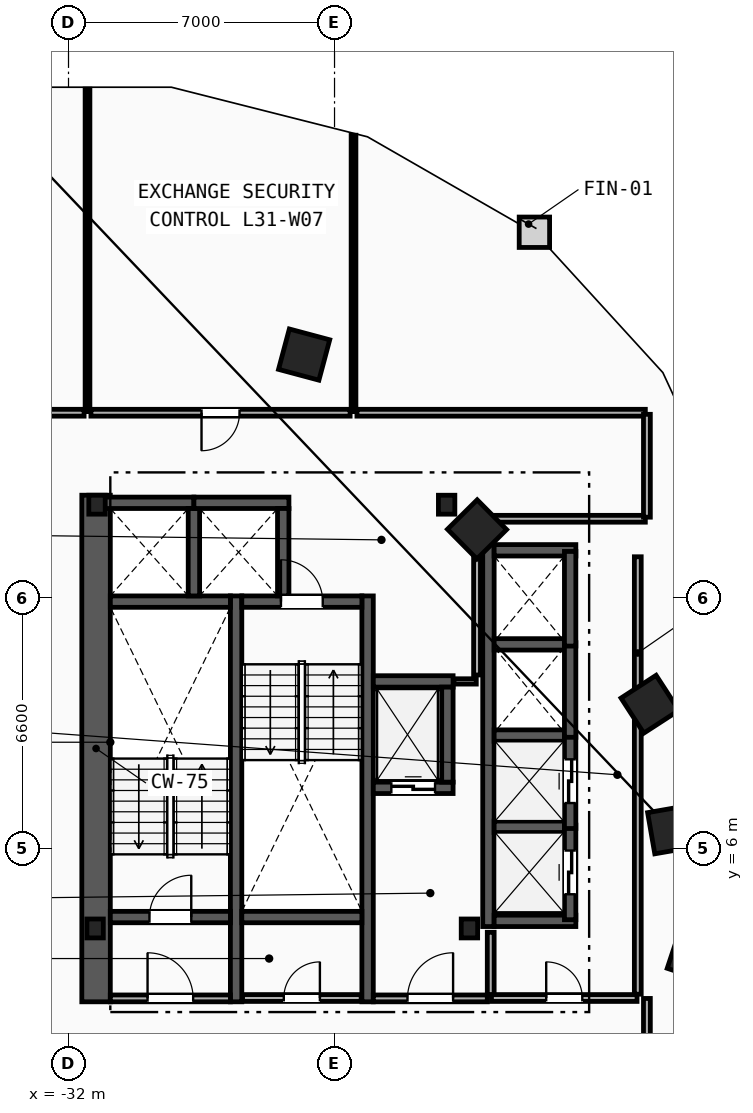
"""IFC4 building model, lengths in metres.
Left out: names, types, materials, properties, quantities, classifications, styles, units other than length and angle.
Written with IfcOpenShell. Run it as: python <this file> out.ifc"""

import sys

from ifc_helpers import new_model, si_unit, direction, frame, frame_2d, origin, origin_2d, place, context, subcontext, project, spatial, rectangle, i_section, extrude, element, fill, save


model = new_model("IFC4")
c1 = context("Model", 3, precision=1e-05, world=origin(), true_north=direction((0.0, 1.0)))
c2 = subcontext(c1, "Body", "Model", "MODEL_VIEW")
j1 = project(units=[si_unit("LENGTHUNIT", "METRE"), si_unit("PLANEANGLEUNIT", "RADIAN")], contexts=[c1])
p1 = place(None, origin())
s1 = spatial("IfcSite", under=j1, at=p1, CompositionType="ELEMENT")
p2 = place(p1, origin())
s2 = spatial("IfcBuilding", under=s1, at=p2, CompositionType="ELEMENT")
p3 = place(p2, frame((0.0, 0.0, 121.4)))
s3 = spatial("IfcBuildingStorey", under=s2, at=p3, CompositionType="ELEMENT", Elevation=121.4)
for number, where, z_axis, x_axis in (
    (1, (-31.3, 3.9, 0.0), (0.0, 0.0, 1.0), (1.0, 0.0, 0.0)),
    (2, (-21.45, 3.9, 0.0), (0.0, 0.0, 1.0), (1.0, 0.0, 0.0)),
    (3, (-22.05, 15.05, 0.0), (0.0, 0.0, 1.0), (1.0, 0.0, 0.0)),
    (4, (-31.25, 15.05, 0.0), (0.0, 0.0, 1.0), (1.0, 0.0, 0.0)),
):
    element("IfcColumn", number, at=place(p3, frame(where, z_axis=z_axis, x_axis=x_axis)), inside=s3, PredefinedType="COLUMN", context=c2, shape_type="SweptSolid", body=[
        extrude(i_section(OverallWidth=0.432, OverallDepth=0.498, WebThickness=0.056, FlangeThickness=0.089, FilletRadius=0.018, at=origin_2d()), origin(), (0.0, 0.0, 1.0), 3.6),
    ])
for number, where, z_axis, x_axis in (
    (5, (-15.55, 3.2, 0.0), (0.0, 0.0, 1.0), (0.315, 0.949, 0.0)),
    (6, (-16.125, 6.5, 0.0), (0.0, 0.0, 1.0), (-0.172, 0.985, 0.0)),
    (7, (-16.7, 9.8, 0.0), (0.0, 0.0, 1.0), (-0.544, 0.839, 0.0)),
    (8, (-21.25, 14.4, 0.0), (0.0, 0.0, 1.0), (-0.703, 0.711, 0.0)),
    (9, (-25.8, 19.0, 0.0), (0.0, 0.0, 1.0), (-0.966, 0.259, 0.0)),
):
    element("IfcColumn", number, at=place(p3, frame(where, z_axis=z_axis, x_axis=x_axis)), inside=s3, PredefinedType="COLUMN", context=c2, shape_type="SweptSolid", body=[
        extrude(rectangle(XDim=1.1, YDim=1.1, at=origin_2d()), origin(), (0.0, 0.0, 1.0), 3.6),
    ])
p4 = place(p3, frame((-31.275, 1.97, 0.0), z_axis=(0.0, 0.0, 1.0), x_axis=(0.0, 1.0, 0.0)))
e10 = element("IfcWall", 10, at=p4, inside=s3, PredefinedType="SHEAR", context=c2, shape_type="SweptSolid", body=[
    extrude(rectangle(XDim=13.33, YDim=0.75, at=frame_2d((6.665, 0.0))), origin(), (0.0, 0.0, 1.0), 3.3),
])
for number, where, z_axis, x_axis in (
    (11, (-27.59, 1.97, 0.0), (0.0, 0.0, 1.0), (0.0, 1.0, 0.0)),
    (12, (-24.13, 1.97, 0.0), (0.0, 0.0, 1.0), (0.0, 1.0, 0.0)),
):
    element("IfcWall", number, at=place(p3, frame(where, z_axis=z_axis, x_axis=x_axis)), inside=s3, PredefinedType="SHEAR", context=c2, shape_type="SweptSolid", body=[
        extrude(rectangle(XDim=10.68, YDim=0.3, at=frame_2d((5.34, 0.0))), origin(), (0.0, 0.0, 1.0), 3.3),
    ])
p5 = place(p3, frame((-30.9, 4.2, 0.0), z_axis=(0.0, 0.0, 1.0), x_axis=(1.0, 0.0, 0.0)))
e13 = element("IfcWall", 13, at=p5, inside=s3, PredefinedType="SHEAR", context=c2, shape_type="SweptSolid", body=[
    extrude(rectangle(XDim=3.16, YDim=0.3, at=frame_2d((1.58, 0.0))), origin(), (0.0, 0.0, 1.0), 3.3),
])
p6 = place(p5, frame((1.03, 0.0, 0.0)))
e14 = element("IfcOpeningElement", 14, at=p6, cuts=e13, PredefinedType="OPENING", context=c2, shape_type="SweptSolid", body=[
    extrude(rectangle(XDim=1.1, YDim=2.15, at=frame_2d((0.55, 1.075))), frame((0.0, 0.16, 0.0), z_axis=(0.0, -1.0, 0.0), x_axis=(1.0, 0.0, 0.0)), (0.0, 0.0, 1.0), 0.32),
])
p7 = place(p3, frame((-30.9, 12.5, 0.0), z_axis=(0.0, 0.0, 1.0), x_axis=(1.0, 0.0, 0.0)))
e15 = element("IfcWall", 15, at=p7, inside=s3, PredefinedType="SHEAR", context=c2, shape_type="SweptSolid", body=[
    extrude(rectangle(XDim=3.16, YDim=0.3, at=frame_2d((1.58, 0.0))), origin(), (0.0, 0.0, 1.0), 3.3),
])
p8 = place(p3, frame((-27.44, 12.5, 0.0), z_axis=(0.0, 0.0, 1.0), x_axis=(1.0, 0.0, 0.0)))
e16 = element("IfcWall", 16, at=p8, inside=s3, PredefinedType="SHEAR", context=c2, shape_type="SweptSolid", body=[
    extrude(rectangle(XDim=3.16, YDim=0.3, at=frame_2d((1.58, 0.0))), origin(), (0.0, 0.0, 1.0), 3.3),
])
p9 = place(p8, frame((1.03, 0.0, 0.0)))
e17 = element("IfcOpeningElement", 17, at=p9, cuts=e16, PredefinedType="OPENING", context=c2, shape_type="SweptSolid", body=[
    extrude(rectangle(XDim=1.1, YDim=2.15, at=frame_2d((0.55, 1.075))), frame((0.0, 0.16, 0.0), z_axis=(0.0, -1.0, 0.0), x_axis=(1.0, 0.0, 0.0)), (0.0, 0.0, 1.0), 0.32),
])
p10 = place(p3, frame((-27.44, 4.2, 0.0), z_axis=(0.0, 0.0, 1.0), x_axis=(1.0, 0.0, 0.0)))
e18 = element("IfcWall", 18, at=p10, inside=s3, PredefinedType="SHEAR", context=c2, shape_type="SweptSolid", body=[
    extrude(rectangle(XDim=3.16, YDim=0.3, at=frame_2d((1.58, 0.0))), origin(), (0.0, 0.0, 1.0), 3.3),
])
p11 = place(p3, frame((-20.89, 2.15, 0.0), z_axis=(0.0, 0.0, 1.0), x_axis=(0.0, 1.0, 0.0)))
e19 = element("IfcWall", 19, at=p11, inside=s3, PredefinedType="PARTITIONING", context=c2, shape_type="SweptSolid", body=[
    extrude(rectangle(XDim=1.65, YDim=0.18, at=frame_2d((0.825, 0.0))), origin(), (0.0, 0.0, 1.0), 3.3),
])
p12 = place(p3, frame((-23.98, 2.06, 0.0), z_axis=(0.0, 0.0, 1.0), x_axis=(1.0, 0.0, 0.0)))
e20 = element("IfcWall", 20, at=p12, inside=s3, PredefinedType="PARTITIONING", context=c2, shape_type="SweptSolid", body=[
    extrude(rectangle(XDim=3.0, YDim=0.18, at=frame_2d((1.5, 0.0))), origin(), (0.0, 0.0, 1.0), 3.3),
])
p13 = place(p12, frame((0.9, 0.0, 0.0)))
e21 = element("IfcOpeningElement", 21, at=p13, cuts=e20, PredefinedType="OPENING", context=c2, shape_type="SweptSolid", body=[
    extrude(rectangle(XDim=1.2, YDim=2.15, at=frame_2d((0.6, 1.075))), frame((0.0, 0.1, 0.0), z_axis=(0.0, -1.0, 0.0), x_axis=(1.0, 0.0, 0.0)), (0.0, 0.0, 1.0), 0.2),
])
p14 = place(p3, frame((-30.9, 2.06, 0.0), z_axis=(0.0, 0.0, 1.0), x_axis=(1.0, 0.0, 0.0)))
e22 = element("IfcWall", 22, at=p14, inside=s3, PredefinedType="PARTITIONING", context=c2, shape_type="SweptSolid", body=[
    extrude(rectangle(XDim=3.16, YDim=0.18, at=frame_2d((1.58, 0.0))), origin(), (0.0, 0.0, 1.0), 3.3),
])
p15 = place(p14, frame((0.98, 0.0, 0.0)))
e23 = element("IfcOpeningElement", 23, at=p15, cuts=e22, PredefinedType="OPENING", context=c2, shape_type="SweptSolid", body=[
    extrude(rectangle(XDim=1.2, YDim=2.15, at=frame_2d((0.6, 1.075))), frame((0.0, 0.1, 0.0), z_axis=(0.0, -1.0, 0.0), x_axis=(1.0, 0.0, 0.0)), (0.0, 0.0, 1.0), 0.2),
])
p16 = place(p3, frame((-23.98, 7.6, 0.0), z_axis=(0.0, 0.0, 1.0), x_axis=(1.0, 0.0, 0.0)))
e24 = element("IfcWall", 24, at=p16, inside=s3, PredefinedType="SHEAR", context=c2, shape_type="SweptSolid", body=[
    extrude(rectangle(XDim=2.1, YDim=0.3, at=frame_2d((1.05, 0.0))), origin(), (0.0, 0.0, 1.0), 3.3),
])
p17 = place(p16, frame((0.475, 0.0, 0.0)))
e25 = element("IfcOpeningElement", 25, at=p17, cuts=e24, PredefinedType="OPENING", context=c2, shape_type="SweptSolid", body=[
    extrude(rectangle(XDim=1.15, YDim=2.2, at=frame_2d((0.575, 1.1))), frame((0.0, 0.16, 0.0), z_axis=(0.0, -1.0, 0.0), x_axis=(1.0, 0.0, 0.0)), (0.0, 0.0, 1.0), 0.32),
])
p18 = place(p3, frame((-23.98, 10.4, 0.0), z_axis=(0.0, 0.0, 1.0), x_axis=(1.0, 0.0, 0.0)))
e26 = element("IfcWall", 26, at=p18, inside=s3, PredefinedType="SHEAR", context=c2, shape_type="SweptSolid", body=[
    extrude(rectangle(XDim=2.1, YDim=0.3, at=frame_2d((1.05, 0.0))), origin(), (0.0, 0.0, 1.0), 3.3),
])
for number, where, z_axis, x_axis in (
    (27, (-22.03, 7.75, 0.0), (0.0, 0.0, 1.0), (0.0, 1.0, 0.0)),
    (28, (-31.2, 15.1, 0.0), (0.0, 0.0, 1.0), (1.0, 0.0, 0.0)),
):
    element("IfcWall", number, at=place(p3, frame(where, z_axis=z_axis, x_axis=x_axis)), inside=s3, PredefinedType="SHEAR", context=c2, shape_type="SweptSolid", body=[
        extrude(rectangle(XDim=2.5, YDim=0.3, at=frame_2d((1.25, 0.0))), origin(), (0.0, 0.0, 1.0), 3.3),
    ])
p19 = place(p3, frame((-28.7, 12.65, 0.0), z_axis=(0.0, 0.0, 1.0), x_axis=(0.0, 1.0, 0.0)))
e29 = element("IfcWall", 29, at=p19, inside=s3, PredefinedType="SHEAR", context=c2, shape_type="SweptSolid", body=[
    extrude(rectangle(XDim=2.3, YDim=0.3, at=frame_2d((1.15, 0.0))), origin(), (0.0, 0.0, 1.0), 3.3),
])
p20 = place(p3, frame((-28.7, 15.1, 0.0), z_axis=(0.0, 0.0, 1.0), x_axis=(1.0, 0.0, 0.0)))
e30 = element("IfcWall", 30, at=p20, inside=s3, PredefinedType="SHEAR", context=c2, shape_type="SweptSolid", body=[
    extrude(rectangle(XDim=2.5, YDim=0.3, at=frame_2d((1.25, 0.0))), origin(), (0.0, 0.0, 1.0), 3.3),
])
p21 = place(p3, frame((-26.35, 12.65, 0.0), z_axis=(0.0, 0.0, 1.0), x_axis=(0.0, 1.0, 0.0)))
e31 = element("IfcWall", 31, at=p21, inside=s3, PredefinedType="SHEAR", context=c2, shape_type="SweptSolid", body=[
    extrude(rectangle(XDim=2.3, YDim=0.3, at=frame_2d((1.15, 0.0))), origin(), (0.0, 0.0, 1.0), 3.3),
])
p22 = place(p3, frame((-20.95, 3.95, 0.0), z_axis=(0.0, 0.0, 1.0), x_axis=(0.0, 1.0, 0.0)))
e32 = element("IfcWall", 32, at=p22, inside=s3, PredefinedType="SHEAR", context=c2, shape_type="SweptSolid", body=[
    extrude(rectangle(XDim=10.05, YDim=0.3, at=frame_2d((5.025, 0.0))), origin(), (0.0, 0.0, 1.0), 3.3),
])
for number, where, z_axis, x_axis in (
    (33, (-20.8, 4.1, 0.0), (0.0, 0.0, 1.0), (1.0, 0.0, 0.0)),
    (34, (-20.8, 13.85, 0.0), (0.0, 0.0, 1.0), (1.0, 0.0, 0.0)),
):
    element("IfcWall", number, at=place(p3, frame(where, z_axis=z_axis, x_axis=x_axis)), inside=s3, PredefinedType="SHEAR", context=c2, shape_type="SweptSolid", body=[
        extrude(rectangle(XDim=2.15, YDim=0.3, at=frame_2d((1.075, 0.0))), origin(), (0.0, 0.0, 1.0), 3.3),
    ])
for number, where, z_axis, x_axis in (
    (35, (-20.8, 6.575, 0.0), (0.0, 0.0, 1.0), (1.0, 0.0, 0.0)),
    (36, (-20.8, 8.975, 0.0), (0.0, 0.0, 1.0), (1.0, 0.0, 0.0)),
    (37, (-20.8, 11.375, 0.0), (0.0, 0.0, 1.0), (1.0, 0.0, 0.0)),
):
    element("IfcWall", number, at=place(p3, frame(where, z_axis=z_axis, x_axis=x_axis)), inside=s3, PredefinedType="SHEAR", context=c2, shape_type="SweptSolid", body=[
        extrude(rectangle(XDim=1.85, YDim=0.3, at=frame_2d((0.925, 0.0))), origin(), (0.0, 0.0, 1.0), 3.3),
    ])
p23 = place(p3, frame((-18.8, 4.13, 0.0), z_axis=(0.0, 0.0, 1.0), x_axis=(0.0, 1.0, 0.0)))
e38 = element("IfcWall", 38, at=p23, inside=s3, PredefinedType="SHEAR", context=c2, shape_type="SweptSolid", body=[
    extrude(rectangle(XDim=2.49, YDim=0.3, at=frame_2d((1.245, 0.0))), origin(), (0.0, 0.0, 1.0), 3.3),
])
p24 = place(p23, frame((0.67, 0.0, 0.0)))
e39 = element("IfcOpeningElement", 39, at=p24, cuts=e38, PredefinedType="OPENING", context=c2, shape_type="SweptSolid", body=[
    extrude(rectangle(XDim=1.15, YDim=2.2, at=frame_2d((0.575, 1.1))), frame((0.0, 0.16, 0.0), z_axis=(0.0, -1.0, 0.0), x_axis=(1.0, 0.0, 0.0)), (0.0, 0.0, 1.0), 0.32),
])
p25 = place(p3, frame((-18.8, 6.53, 0.0), z_axis=(0.0, 0.0, 1.0), x_axis=(0.0, 1.0, 0.0)))
e40 = element("IfcWall", 40, at=p25, inside=s3, PredefinedType="SHEAR", context=c2, shape_type="SweptSolid", body=[
    extrude(rectangle(XDim=2.49, YDim=0.3, at=frame_2d((1.245, 0.0))), origin(), (0.0, 0.0, 1.0), 3.3),
])
p26 = place(p25, frame((0.67, 0.0, 0.0)))
e41 = element("IfcOpeningElement", 41, at=p26, cuts=e40, PredefinedType="OPENING", context=c2, shape_type="SweptSolid", body=[
    extrude(rectangle(XDim=1.15, YDim=2.2, at=frame_2d((0.575, 1.1))), frame((0.0, 0.16, 0.0), z_axis=(0.0, -1.0, 0.0), x_axis=(1.0, 0.0, 0.0)), (0.0, 0.0, 1.0), 0.32),
])
for number, where, z_axis, x_axis in (
    (42, (-18.8, 8.93, 0.0), (0.0, 0.0, 1.0), (0.0, 1.0, 0.0)),
    (43, (-18.8, 11.33, 0.0), (0.0, 0.0, 1.0), (0.0, 1.0, 0.0)),
):
    element("IfcWall", number, at=place(p3, frame(where, z_axis=z_axis, x_axis=x_axis)), inside=s3, PredefinedType="SHEAR", context=c2, shape_type="SweptSolid", body=[
        extrude(rectangle(XDim=2.49, YDim=0.3, at=frame_2d((1.245, 0.0))), origin(), (0.0, 0.0, 1.0), 3.3),
    ])
p27 = place(p3, frame((-17.02, 2.17, 0.0), z_axis=(0.0, 0.0, 1.0), x_axis=(0.0, 1.0, 0.0)))
e44 = element("IfcWall", 44, at=p27, inside=s3, PredefinedType="PARTITIONING", context=c2, shape_type="SweptSolid", body=[
    extrude(rectangle(XDim=11.51, YDim=0.18, at=frame_2d((5.755, 0.0))), origin(), (0.0, 0.0, 1.0), 3.3),
])
p28 = place(p3, frame((-20.87, 2.07, 0.0), z_axis=(0.0, 0.0, 1.0), x_axis=(1.0, 0.0, 0.0)))
e45 = element("IfcWall", 45, at=p28, inside=s3, PredefinedType="PARTITIONING", context=c2, shape_type="SweptSolid", body=[
    extrude(rectangle(XDim=3.83, YDim=0.18, at=frame_2d((1.915, 0.0))), origin(), (0.0, 0.0, 1.0), 3.3),
])
p29 = place(p28, frame((1.44, 0.0, 0.0)))
e46 = element("IfcOpeningElement", 46, at=p29, cuts=e45, PredefinedType="OPENING", context=c2, shape_type="SweptSolid", body=[
    extrude(rectangle(XDim=0.95, YDim=2.1, at=frame_2d((0.475, 1.05))), frame((0.0, 0.1, 0.0), z_axis=(0.0, -1.0, 0.0), x_axis=(1.0, 0.0, 0.0)), (0.0, 0.0, 1.0), 0.2),
])
p30 = place(p3, frame((-21.86, 10.4, 0.0), z_axis=(0.0, 0.0, 1.0), x_axis=(1.0, 0.0, 0.0)))
e47 = element("IfcWall", 47, at=p30, inside=s3, PredefinedType="PARTITIONING", context=c2, shape_type="SweptSolid", body=[
    extrude(rectangle(XDim=0.59, YDim=0.14, at=frame_2d((0.295, 0.0))), origin(), (0.0, 0.0, 1.0), 3.3),
])
p31 = place(p3, frame((-21.25, 10.57, 0.0), z_axis=(0.0, 0.0, 1.0), x_axis=(0.0, 1.0, 0.0)))
e48 = element("IfcWall", 48, at=p31, inside=s3, PredefinedType="PARTITIONING", context=c2, shape_type="SweptSolid", body=[
    extrude(rectangle(XDim=4.36, YDim=0.18, at=frame_2d((2.18, 0.0))), origin(), (0.0, 0.0, 1.0), 3.3),
])
p32 = place(p3, frame((-27.42, 2.07, 0.0), z_axis=(0.0, 0.0, 1.0), x_axis=(1.0, 0.0, 0.0)))
e49 = element("IfcWall", 49, at=p32, inside=s3, PredefinedType="PARTITIONING", context=c2, shape_type="SweptSolid", body=[
    extrude(rectangle(XDim=3.12, YDim=0.18, at=frame_2d((1.56, 0.0))), origin(), (0.0, 0.0, 1.0), 3.3),
])
p33 = place(p32, frame((1.085, 0.0, 0.0)))
e50 = element("IfcOpeningElement", 50, at=p33, cuts=e49, PredefinedType="OPENING", context=c2, shape_type="SweptSolid", body=[
    extrude(rectangle(XDim=0.95, YDim=2.1, at=frame_2d((0.475, 1.05))), frame((0.0, 0.1, 0.0), z_axis=(0.0, -1.0, 0.0), x_axis=(1.0, 0.0, 0.0)), (0.0, 0.0, 1.0), 0.2),
])
p34 = place(p3, frame((-31.5, 17.5, 0.0), z_axis=(0.0, 0.0, 1.0), x_axis=(0.0, 1.0, 0.0)))
e51 = element("IfcWall", 51, at=p34, inside=s3, PredefinedType="PARTITIONING", context=c2, shape_type="SweptSolid", body=[
    extrude(rectangle(XDim=8.485, YDim=0.125, at=frame_2d((4.243, 0.0))), origin(), (0.0, 0.0, 1.0), 3.3),
])
p35 = place(p3, frame((-24.5, 17.5, 0.0), z_axis=(0.0, 0.0, 1.0), x_axis=(0.0, 1.0, 0.0)))
e52 = element("IfcWall", 52, at=p35, inside=s3, PredefinedType="PARTITIONING", context=c2, shape_type="SweptSolid", body=[
    extrude(rectangle(XDim=7.272, YDim=0.125, at=frame_2d((3.636, 0.0))), origin(), (0.0, 0.0, 1.0), 3.3),
])
p36 = place(p3, frame((-16.822, 17.47, 0.0), z_axis=(0.0, 0.0, 1.0), x_axis=(-1.0, 0.0, 0.0)))
e53 = element("IfcWall", 53, at=p36, inside=s3, PredefinedType="PARTITIONING", context=c2, shape_type="SweptSolid", body=[
    extrude(rectangle(XDim=7.588, YDim=0.18, at=frame_2d((3.794, 0.0))), origin(), (0.0, 0.0, 1.0), 3.3),
])
p37 = place(p3, frame((-21.178, 14.68, 0.0), z_axis=(0.0, 0.0, 1.0), x_axis=(1.0, 0.0, 0.0)))
e54 = element("IfcWall", 54, at=p37, inside=s3, PredefinedType="PARTITIONING", context=c2, shape_type="SweptSolid", body=[
    extrude(rectangle(XDim=4.357, YDim=0.18, at=frame_2d((2.178, 0.0))), origin(), (0.0, 0.0, 1.0), 3.3),
])
p38 = place(p3, frame((-16.78, 14.721, 0.0), z_axis=(0.0, 0.0, 1.0), x_axis=(0.0, 1.0, 0.0)))
e55 = element("IfcWall", 55, at=p38, inside=s3, PredefinedType="PARTITIONING", context=c2, shape_type="SweptSolid", body=[
    extrude(rectangle(XDim=2.707, YDim=0.18, at=frame_2d((1.354, 0.0))), origin(), (0.0, 0.0, 1.0), 3.3),
])
p39 = place(p3, frame((-16.78, -0.329, 0.0), z_axis=(0.0, 0.0, 1.0), x_axis=(0.0, 1.0, 0.0)))
e56 = element("IfcWall", 56, at=p39, inside=s3, PredefinedType="PARTITIONING", context=c2, shape_type="SweptSolid", body=[
    extrude(rectangle(XDim=2.387, YDim=0.18, at=frame_2d((1.194, 0.0))), origin(), (0.0, 0.0, 1.0), 3.3),
])
p40 = place(p3, frame((-31.59, 17.47, 0.0), z_axis=(0.0, 0.0, 1.0), x_axis=(-1.0, 0.0, 0.0)))
e57 = element("IfcWall", 57, at=p40, inside=s3, PredefinedType="PARTITIONING", context=c2, shape_type="SweptSolid", body=[
    extrude(rectangle(XDim=2.038, YDim=0.18, at=frame_2d((1.019, 0.0))), origin(), (0.0, 0.0, 1.0), 3.3),
])
p41 = place(p3, frame((-24.59, 17.47, 0.0), z_axis=(0.0, 0.0, 1.0), x_axis=(-1.0, 0.0, 0.0)))
e58 = element("IfcWall", 58, at=p41, inside=s3, PredefinedType="PARTITIONING", context=c2, shape_type="SweptSolid", body=[
    extrude(rectangle(XDim=6.82, YDim=0.18, at=frame_2d((3.41, 0.0))), origin(), (0.0, 0.0, 1.0), 3.3),
])
p42 = place(p41, frame((2.91, 0.0, 0.0)))
e59 = element("IfcOpeningElement", 59, at=p42, cuts=e58, PredefinedType="OPENING", context=c2, shape_type="SweptSolid", body=[
    extrude(rectangle(XDim=1.0, YDim=2.15, at=frame_2d((0.5, 1.075))), frame((0.0, 0.1, 0.0), z_axis=(0.0, -1.0, 0.0), x_axis=(1.0, 0.0, 0.0)), (0.0, 0.0, 1.0), 0.2),
])
p43 = place(p6, origin())
e60 = element("IfcDoor", 60, at=p43, inside=s3, OperationType="SINGLE_SWING_RIGHT", PredefinedType="DOOR", context=c2, shape_type="SweptSolid", body=[
    extrude(rectangle(XDim=1.1, YDim=2.15, at=frame_2d((0.55, 1.075))), frame((0.0, 0.025, 0.0), z_axis=(0.0, -1.0, 0.0), x_axis=(1.0, 0.0, 0.0)), (0.0, 0.0, 1.0), 0.05),
])
fill(e14, e60)
p44 = place(p9, origin())
e61 = element("IfcDoor", 61, at=p44, inside=s3, OperationType="SINGLE_SWING_LEFT", PredefinedType="DOOR", context=c2, shape_type="SweptSolid", body=[
    extrude(rectangle(XDim=1.1, YDim=2.15, at=frame_2d((0.55, 1.075))), frame((0.0, 0.025, 0.0), z_axis=(0.0, -1.0, 0.0), x_axis=(1.0, 0.0, 0.0)), (0.0, 0.0, 1.0), 0.05),
])
fill(e17, e61)
p45 = place(p13, origin())
e62 = element("IfcDoor", 62, at=p45, inside=s3, OperationType="SINGLE_SWING_RIGHT", PredefinedType="DOOR", context=c2, shape_type="SweptSolid", body=[
    extrude(rectangle(XDim=1.2, YDim=2.15, at=frame_2d((0.6, 1.075))), frame((0.0, 0.025, 0.0), z_axis=(0.0, -1.0, 0.0), x_axis=(1.0, 0.0, 0.0)), (0.0, 0.0, 1.0), 0.05),
])
fill(e21, e62)
p46 = place(p15, origin())
e63 = element("IfcDoor", 63, at=p46, inside=s3, OperationType="SINGLE_SWING_LEFT", PredefinedType="DOOR", context=c2, shape_type="SweptSolid", body=[
    extrude(rectangle(XDim=1.2, YDim=2.15, at=frame_2d((0.6, 1.075))), frame((0.0, 0.025, 0.0), z_axis=(0.0, -1.0, 0.0), x_axis=(1.0, 0.0, 0.0)), (0.0, 0.0, 1.0), 0.05),
])
fill(e23, e63)
p47 = place(p17, origin())
e64 = element("IfcDoor", 64, at=p47, inside=s3, OperationType="SLIDING_TO_LEFT", PredefinedType="TRAPDOOR", context=c2, shape_type="SweptSolid", body=[
    extrude(rectangle(XDim=1.15, YDim=2.2, at=frame_2d((0.575, 1.1))), frame((0.0, 0.025, 0.0), z_axis=(0.0, -1.0, 0.0), x_axis=(1.0, 0.0, 0.0)), (0.0, 0.0, 1.0), 0.05),
])
fill(e25, e64)
p48 = place(p24, origin())
e65 = element("IfcDoor", 65, at=p48, inside=s3, OperationType="SLIDING_TO_LEFT", PredefinedType="TRAPDOOR", context=c2, shape_type="SweptSolid", body=[
    extrude(rectangle(XDim=1.15, YDim=2.2, at=frame_2d((0.575, 1.1))), frame((0.0, 0.025, 0.0), z_axis=(0.0, -1.0, 0.0), x_axis=(1.0, 0.0, 0.0)), (0.0, 0.0, 1.0), 0.05),
])
fill(e39, e65)
p49 = place(p26, origin())
e66 = element("IfcDoor", 66, at=p49, inside=s3, OperationType="SLIDING_TO_LEFT", PredefinedType="TRAPDOOR", context=c2, shape_type="SweptSolid", body=[
    extrude(rectangle(XDim=1.15, YDim=2.2, at=frame_2d((0.575, 1.1))), frame((0.0, 0.025, 0.0), z_axis=(0.0, -1.0, 0.0), x_axis=(1.0, 0.0, 0.0)), (0.0, 0.0, 1.0), 0.05),
])
fill(e41, e66)
p50 = place(p42, origin())
e67 = element("IfcDoor", 67, at=p50, inside=s3, OperationType="SINGLE_SWING_RIGHT", PredefinedType="DOOR", context=c2, shape_type="SweptSolid", body=[
    extrude(rectangle(XDim=1.0, YDim=2.15, at=frame_2d((0.5, 1.075))), frame((0.0, 0.025, 0.0), z_axis=(0.0, -1.0, 0.0), x_axis=(1.0, 0.0, 0.0)), (0.0, 0.0, 1.0), 0.05),
])
fill(e59, e67)
p51 = place(p29, origin())
e68 = element("IfcDoor", 68, at=p51, inside=s3, OperationType="SINGLE_SWING_LEFT", PredefinedType="DOOR", context=c2, shape_type="SweptSolid", body=[
    extrude(rectangle(XDim=0.95, YDim=2.1, at=frame_2d((0.475, 1.05))), frame((0.0, 0.025, 0.0), z_axis=(0.0, -1.0, 0.0), x_axis=(1.0, 0.0, 0.0)), (0.0, 0.0, 1.0), 0.05),
])
fill(e46, e68)
p52 = place(p33, origin())
e69 = element("IfcDoor", 69, at=p52, inside=s3, OperationType="SINGLE_SWING_RIGHT", PredefinedType="DOOR", context=c2, shape_type="SweptSolid", body=[
    extrude(rectangle(XDim=0.95, YDim=2.1, at=frame_2d((0.475, 1.05))), frame((0.0, 0.025, 0.0), z_axis=(0.0, -1.0, 0.0), x_axis=(1.0, 0.0, 0.0)), (0.0, 0.0, 1.0), 0.05),
])
fill(e50, e69)
save(model, sys.argv[1])
